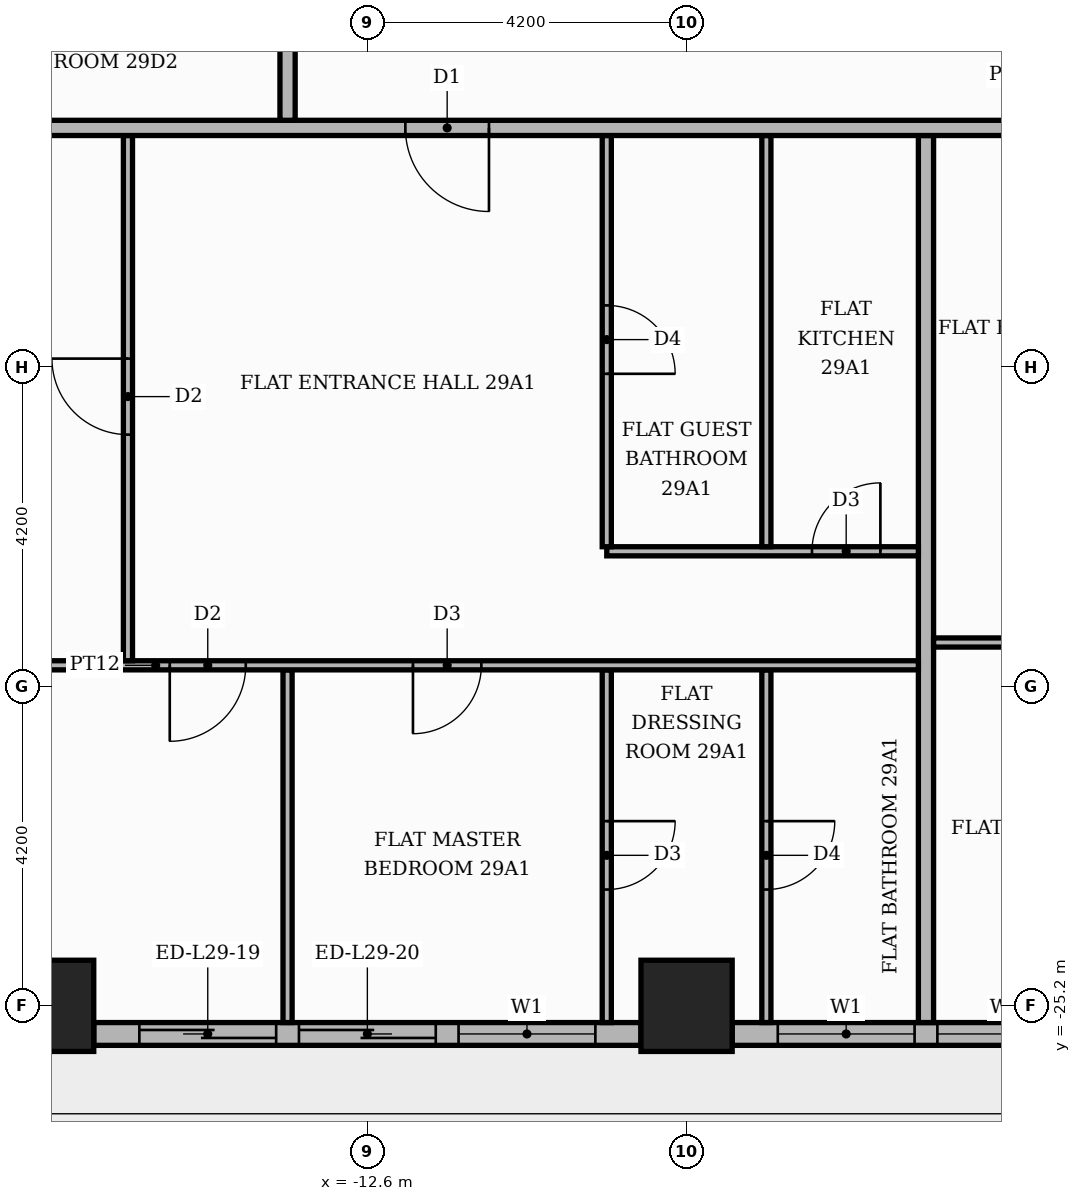
"""IFC4 building model, lengths in metres.
Left out: names, types, materials, properties, quantities, classifications, styles, units other than length and angle.
Written with IfcOpenShell. Run it as: python <this file> out.ifc"""

import sys

from ifc_helpers import new_model, si_unit, direction, frame, frame_2d, origin, origin_2d, place, context, subcontext, project, spatial, rectangle, extrude, element, fill, save


model = new_model("IFC4")
c1 = context("Model", 3, precision=1e-05, world=origin(), true_north=direction((0.0, 1.0)))
c2 = subcontext(c1, "Body", "Model", "MODEL_VIEW")
j1 = project(units=[si_unit("LENGTHUNIT", "METRE"), si_unit("PLANEANGLEUNIT", "RADIAN")], contexts=[c1])
p1 = place(None, origin())
s1 = spatial("IfcSite", under=j1, at=p1, CompositionType="ELEMENT")
p2 = place(p1, origin())
s2 = spatial("IfcBuilding", under=s1, at=p2, CompositionType="ELEMENT")
p3 = place(p2, frame((0.0, 0.0, 122.1)))
s3 = spatial("IfcBuildingStorey", under=s2, at=p3, CompositionType="ELEMENT", Elevation=122.1)
for number, where, z_axis, x_axis in (
    (1, (-8.4, -25.2, 0.0), (0.0, 0.0, 1.0), (1.0, 0.0, 0.0)),
    (2, (-16.8, -25.2, 0.0), (0.0, 0.0, 1.0), (1.0, 0.0, 0.0)),
):
    element("IfcColumn", number, at=place(p3, frame(where, z_axis=z_axis, x_axis=x_axis)), inside=s3, PredefinedType="COLUMN", context=c2, shape_type="SweptSolid", body=[
        extrude(rectangle(XDim=1.2, YDim=1.2, at=origin_2d()), origin(), (0.0, 0.0, 1.0), 3.9),
    ])
p4 = place(p3, frame((-16.2, -25.57, 0.0), z_axis=(0.0, 0.0, 1.0), x_axis=(1.0, 0.0, 0.0)))
e3 = element("IfcWall", 3, at=p4, inside=s3, PredefinedType="STANDARD", context=c2, shape_type="SweptSolid", body=[
    extrude(rectangle(XDim=7.2, YDim=0.3, at=frame_2d((3.6, 0.0))), origin(), (0.0, 0.0, 1.0), 3.4),
])
p5 = place(p4, frame((0.6, 0.0, 0.0)))
e4 = element("IfcOpeningElement", 4, at=p5, cuts=e3, PredefinedType="OPENING", context=c2, shape_type="SweptSolid", body=[
    extrude(rectangle(XDim=1.8, YDim=2.4, at=frame_2d((0.9, 1.2))), frame((0.0, 0.16, 0.0), z_axis=(0.0, -1.0, 0.0), x_axis=(1.0, 0.0, 0.0)), (0.0, 0.0, 1.0), 0.32),
])
p6 = place(p4, frame((2.7, 0.0, 0.0)))
e5 = element("IfcOpeningElement", 5, at=p6, cuts=e3, PredefinedType="OPENING", context=c2, shape_type="SweptSolid", body=[
    extrude(rectangle(XDim=1.8, YDim=2.4, at=frame_2d((0.9, 1.2))), frame((0.0, 0.16, 0.0), z_axis=(0.0, -1.0, 0.0), x_axis=(1.0, 0.0, 0.0)), (0.0, 0.0, 1.0), 0.32),
])
p7 = place(p4, frame((4.8, 0.0, 0.9)))
e6 = element("IfcOpeningElement", 6, at=p7, cuts=e3, PredefinedType="OPENING", context=c2, shape_type="SweptSolid", body=[
    extrude(rectangle(XDim=1.8, YDim=2.1, at=frame_2d((0.9, 1.05))), frame((0.0, 0.16, 0.0), z_axis=(0.0, -1.0, 0.0), x_axis=(1.0, 0.0, 0.0)), (0.0, 0.0, 1.0), 0.32),
])
p8 = place(p3, frame((-7.8, -25.57, 0.0), z_axis=(0.0, 0.0, 1.0), x_axis=(1.0, 0.0, 0.0)))
e7 = element("IfcWall", 7, at=p8, inside=s3, PredefinedType="STANDARD", context=c2, shape_type="SweptSolid", body=[
    extrude(rectangle(XDim=7.2, YDim=0.3, at=frame_2d((3.6, 0.0))), origin(), (0.0, 0.0, 1.0), 3.4),
])
p9 = place(p8, frame((0.6, 0.0, 0.9)))
e8 = element("IfcOpeningElement", 8, at=p9, cuts=e7, PredefinedType="OPENING", context=c2, shape_type="SweptSolid", body=[
    extrude(rectangle(XDim=1.8, YDim=2.1, at=frame_2d((0.9, 1.05))), frame((0.0, 0.16, 0.0), z_axis=(0.0, -1.0, 0.0), x_axis=(1.0, 0.0, 0.0)), (0.0, 0.0, 1.0), 0.32),
])
p10 = place(p8, frame((2.7, 0.0, 0.9)))
e9 = element("IfcOpeningElement", 9, at=p10, cuts=e7, PredefinedType="OPENING", context=c2, shape_type="SweptSolid", body=[
    extrude(rectangle(XDim=1.8, YDim=2.1, at=frame_2d((0.9, 1.05))), frame((0.0, 0.16, 0.0), z_axis=(0.0, -1.0, 0.0), x_axis=(1.0, 0.0, 0.0)), (0.0, 0.0, 1.0), 0.32),
])
p11 = place(p8, frame((4.8, 0.0, 0.0)))
e10 = element("IfcOpeningElement", 10, at=p11, cuts=e7, PredefinedType="OPENING", context=c2, shape_type="SweptSolid", body=[
    extrude(rectangle(XDim=1.8, YDim=2.4, at=frame_2d((0.9, 1.2))), frame((0.0, 0.16, 0.0), z_axis=(0.0, -1.0, 0.0), x_axis=(1.0, 0.0, 0.0)), (0.0, 0.0, 1.0), 0.32),
])
p12 = place(p3, frame((-13.65, -25.42, 0.0), z_axis=(0.0, 0.0, 1.0), x_axis=(0.0, 1.0, 0.0)))
e11 = element("IfcWall", 11, at=p12, inside=s3, PredefinedType="PARTITIONING", context=c2, shape_type="SweptSolid", body=[
    extrude(rectangle(XDim=4.64, YDim=0.12, at=frame_2d((2.32, 0.0))), origin(), (0.0, 0.0, 1.0), 3.4),
])
p13 = place(p3, frame((-9.45, -25.42, 0.0), z_axis=(0.0, 0.0, 1.0), x_axis=(0.0, 1.0, 0.0)))
e12 = element("IfcWall", 12, at=p13, inside=s3, PredefinedType="PARTITIONING", context=c2, shape_type="SweptSolid", body=[
    extrude(rectangle(XDim=4.64, YDim=0.12, at=frame_2d((2.32, 0.0))), origin(), (0.0, 0.0, 1.0), 3.4),
])
p14 = place(p13, frame((1.75, 0.0, 0.0)))
e13 = element("IfcOpeningElement", 13, at=p14, cuts=e12, PredefinedType="OPENING", context=c2, shape_type="SweptSolid", body=[
    extrude(rectangle(XDim=0.9, YDim=2.1, at=frame_2d((0.45, 1.05))), frame((0.0, 0.07, 0.0), z_axis=(0.0, -1.0, 0.0), x_axis=(1.0, 0.0, 0.0)), (0.0, 0.0, 1.0), 0.14),
])
p15 = place(p3, frame((-7.35, -25.42, 0.0), z_axis=(0.0, 0.0, 1.0), x_axis=(0.0, 1.0, 0.0)))
e14 = element("IfcWall", 14, at=p15, inside=s3, PredefinedType="PARTITIONING", context=c2, shape_type="SweptSolid", body=[
    extrude(rectangle(XDim=4.64, YDim=0.12, at=frame_2d((2.32, 0.0))), origin(), (0.0, 0.0, 1.0), 3.4),
])
p16 = place(p15, frame((1.75, 0.0, 0.0)))
e15 = element("IfcOpeningElement", 15, at=p16, cuts=e14, PredefinedType="OPENING", context=c2, shape_type="SweptSolid", body=[
    extrude(rectangle(XDim=0.9, YDim=2.1, at=frame_2d((0.45, 1.05))), frame((0.0, 0.07, 0.0), z_axis=(0.0, -1.0, 0.0), x_axis=(1.0, 0.0, 0.0)), (0.0, 0.0, 1.0), 0.14),
])
p17 = place(p3, frame((-5.25, -25.42, 0.0), z_axis=(0.0, 0.0, 1.0), x_axis=(0.0, 1.0, 0.0)))
e16 = element("IfcWall", 16, at=p17, inside=s3, PredefinedType="PARTITIONING", context=c2, shape_type="SweptSolid", body=[
    extrude(rectangle(XDim=11.67, YDim=0.2, at=frame_2d((5.835, 0.0))), origin(), (0.0, 0.0, 1.0), 3.4),
])
p18 = place(p3, frame((-25.42, -20.72, 0.0), z_axis=(0.0, 0.0, 1.0), x_axis=(1.0, 0.0, 0.0)))
e17 = element("IfcWall", 17, at=p18, inside=s3, PredefinedType="PARTITIONING", context=c2, shape_type="SweptSolid", body=[
    extrude(rectangle(XDim=20.07, YDim=0.12, at=frame_2d((10.035, 0.0))), origin(), (0.0, 0.0, 1.0), 3.4),
])
p19 = place(p18, frame((10.22, 0.0, 0.0)))
e18 = element("IfcOpeningElement", 18, at=p19, cuts=e17, PredefinedType="OPENING", context=c2, shape_type="SweptSolid", body=[
    extrude(rectangle(XDim=1.0, YDim=2.1, at=frame_2d((0.5, 1.05))), frame((0.0, 0.07, 0.0), z_axis=(0.0, -1.0, 0.0), x_axis=(1.0, 0.0, 0.0)), (0.0, 0.0, 1.0), 0.14),
])
p20 = place(p18, frame((13.42, 0.0, 0.0)))
e19 = element("IfcOpeningElement", 19, at=p20, cuts=e17, PredefinedType="OPENING", context=c2, shape_type="SweptSolid", body=[
    extrude(rectangle(XDim=0.9, YDim=2.1, at=frame_2d((0.45, 1.05))), frame((0.0, 0.07, 0.0), z_axis=(0.0, -1.0, 0.0), x_axis=(1.0, 0.0, 0.0)), (0.0, 0.0, 1.0), 0.14),
])
p21 = place(p3, frame((-15.75, -20.66, 0.0), z_axis=(0.0, 0.0, 1.0), x_axis=(0.0, 1.0, 0.0)))
e20 = element("IfcWall", 20, at=p21, inside=s3, PredefinedType="PARTITIONING", context=c2, shape_type="SweptSolid", body=[
    extrude(rectangle(XDim=6.91, YDim=0.12, at=frame_2d((3.455, 0.0))), origin(), (0.0, 0.0, 1.0), 3.4),
])
p22 = place(p21, frame((2.975, 0.0, 0.0)))
e21 = element("IfcOpeningElement", 21, at=p22, cuts=e20, PredefinedType="OPENING", context=c2, shape_type="SweptSolid", body=[
    extrude(rectangle(XDim=1.0, YDim=2.1, at=frame_2d((0.5, 1.05))), frame((0.0, 0.07, 0.0), z_axis=(0.0, -1.0, 0.0), x_axis=(1.0, 0.0, 0.0)), (0.0, 0.0, 1.0), 0.14),
])
p23 = place(p3, frame((-5.15, -20.42, 0.0), z_axis=(0.0, 0.0, 1.0), x_axis=(1.0, 0.0, 0.0)))
e22 = element("IfcWall", 22, at=p23, inside=s3, PredefinedType="PARTITIONING", context=c2, shape_type="SweptSolid", body=[
    extrude(rectangle(XDim=18.7, YDim=0.12, at=frame_2d((9.35, 0.0))), origin(), (0.0, 0.0, 1.0), 3.4),
])
p24 = place(p23, frame((3.65, 0.0, 0.0)))
e23 = element("IfcOpeningElement", 23, at=p24, cuts=e22, PredefinedType="OPENING", context=c2, shape_type="SweptSolid", body=[
    extrude(rectangle(XDim=0.9, YDim=2.1, at=frame_2d((0.45, 1.05))), frame((0.0, 0.07, 0.0), z_axis=(0.0, -1.0, 0.0), x_axis=(1.0, 0.0, 0.0)), (0.0, 0.0, 1.0), 0.14),
])
p25 = place(p23, frame((15.15, 0.0, 0.0)))
e24 = element("IfcOpeningElement", 24, at=p25, cuts=e22, PredefinedType="OPENING", context=c2, shape_type="SweptSolid", body=[
    extrude(rectangle(XDim=1.0, YDim=2.1, at=frame_2d((0.5, 1.05))), frame((0.0, 0.07, 0.0), z_axis=(0.0, -1.0, 0.0), x_axis=(1.0, 0.0, 0.0)), (0.0, 0.0, 1.0), 0.14),
])
p26 = place(p3, frame((-9.45, -19.22, 0.0), z_axis=(0.0, 0.0, 1.0), x_axis=(1.0, 0.0, 0.0)))
e25 = element("IfcWall", 25, at=p26, inside=s3, PredefinedType="PARTITIONING", context=c2, shape_type="SweptSolid", body=[
    extrude(rectangle(XDim=4.1, YDim=0.12, at=frame_2d((2.05, 0.0))), origin(), (0.0, 0.0, 1.0), 3.4),
])
p27 = place(p26, frame((2.7, 0.0, 0.0)))
e26 = element("IfcOpeningElement", 26, at=p27, cuts=e25, PredefinedType="OPENING", context=c2, shape_type="SweptSolid", body=[
    extrude(rectangle(XDim=0.9, YDim=2.1, at=frame_2d((0.45, 1.05))), frame((0.0, 0.07, 0.0), z_axis=(0.0, -1.0, 0.0), x_axis=(1.0, 0.0, 0.0)), (0.0, 0.0, 1.0), 0.14),
])
p28 = place(p3, frame((-9.45, -19.16, 0.0), z_axis=(0.0, 0.0, 1.0), x_axis=(0.0, 1.0, 0.0)))
e27 = element("IfcWall", 27, at=p28, inside=s3, PredefinedType="PARTITIONING", context=c2, shape_type="SweptSolid", body=[
    extrude(rectangle(XDim=5.41, YDim=0.12, at=frame_2d((2.705, 0.0))), origin(), (0.0, 0.0, 1.0), 3.4),
])
p29 = place(p28, frame((2.275, 0.0, 0.0)))
e28 = element("IfcOpeningElement", 28, at=p29, cuts=e27, PredefinedType="OPENING", context=c2, shape_type="SweptSolid", body=[
    extrude(rectangle(XDim=0.9, YDim=2.1, at=frame_2d((0.45, 1.05))), frame((0.0, 0.07, 0.0), z_axis=(0.0, -1.0, 0.0), x_axis=(1.0, 0.0, 0.0)), (0.0, 0.0, 1.0), 0.14),
])
p30 = place(p3, frame((-7.35, -19.16, 0.0), z_axis=(0.0, 0.0, 1.0), x_axis=(0.0, 1.0, 0.0)))
e29 = element("IfcWall", 29, at=p30, inside=s3, PredefinedType="PARTITIONING", context=c2, shape_type="SweptSolid", body=[
    extrude(rectangle(XDim=5.41, YDim=0.12, at=frame_2d((2.705, 0.0))), origin(), (0.0, 0.0, 1.0), 3.4),
])
p31 = place(p3, frame((-20.42, -13.65, 0.0), z_axis=(0.0, 0.0, 1.0), x_axis=(1.0, 0.0, 0.0)))
e30 = element("IfcWall", 30, at=p31, inside=s3, PredefinedType="PARTITIONING", context=c2, shape_type="SweptSolid", body=[
    extrude(rectangle(XDim=34.07, YDim=0.2, at=frame_2d((17.035, 0.0))), origin(), (0.0, 0.0, 1.0), 3.4),
])
p32 = place(p31, frame((8.32, 0.0, 0.0)))
e31 = element("IfcOpeningElement", 31, at=p32, cuts=e30, PredefinedType="OPENING", context=c2, shape_type="SweptSolid", body=[
    extrude(rectangle(XDim=1.1, YDim=2.4, at=frame_2d((0.55, 1.2))), frame((0.0, 0.11, 0.0), z_axis=(0.0, -1.0, 0.0), x_axis=(1.0, 0.0, 0.0)), (0.0, 0.0, 1.0), 0.22),
])
p33 = place(p31, frame((16.72, 0.0, 0.0)))
e32 = element("IfcOpeningElement", 32, at=p33, cuts=e30, PredefinedType="OPENING", context=c2, shape_type="SweptSolid", body=[
    extrude(rectangle(XDim=1.1, YDim=2.4, at=frame_2d((0.55, 1.2))), frame((0.0, 0.11, 0.0), z_axis=(0.0, -1.0, 0.0), x_axis=(1.0, 0.0, 0.0)), (0.0, 0.0, 1.0), 0.22),
])
p34 = place(p3, frame((-13.65, -13.55, 0.0), z_axis=(0.0, 0.0, 1.0), x_axis=(0.0, 1.0, 0.0)))
e33 = element("IfcWall", 33, at=p34, inside=s3, PredefinedType="PARTITIONING", context=c2, shape_type="SweptSolid", body=[
    extrude(rectangle(XDim=18.7, YDim=0.2, at=frame_2d((9.35, 0.0))), origin(), (0.0, 0.0, 1.0), 3.4),
])
p35 = place(p34, frame((11.95, 0.0, 0.0)))
e34 = element("IfcOpeningElement", 34, at=p35, cuts=e33, PredefinedType="OPENING", context=c2, shape_type="SweptSolid", body=[
    extrude(rectangle(XDim=1.1, YDim=2.4, at=frame_2d((0.55, 1.2))), frame((0.0, 0.11, 0.0), z_axis=(0.0, -1.0, 0.0), x_axis=(1.0, 0.0, 0.0)), (0.0, 0.0, 1.0), 0.22),
])
p36 = place(p5, origin())
e35 = element("IfcDoor", 35, at=p36, inside=s3, OperationType="SLIDING_TO_LEFT", PredefinedType="DOOR", context=c2, shape_type="SweptSolid", body=[
    extrude(rectangle(XDim=1.8, YDim=2.4, at=frame_2d((0.9, 1.2))), frame((0.0, 0.025, 0.0), z_axis=(0.0, -1.0, 0.0), x_axis=(1.0, 0.0, 0.0)), (0.0, 0.0, 1.0), 0.05),
])
fill(e4, e35)
p37 = place(p6, origin())
e36 = element("IfcDoor", 36, at=p37, inside=s3, OperationType="SLIDING_TO_RIGHT", PredefinedType="DOOR", context=c2, shape_type="SweptSolid", body=[
    extrude(rectangle(XDim=1.8, YDim=2.4, at=frame_2d((0.9, 1.2))), frame((0.0, 0.025, 0.0), z_axis=(0.0, -1.0, 0.0), x_axis=(1.0, 0.0, 0.0)), (0.0, 0.0, 1.0), 0.05),
])
fill(e5, e36)
p38 = place(p7, origin())
e37 = element("IfcWindow", 37, at=p38, inside=s3, PartitioningType="SINGLE_PANEL", PredefinedType="WINDOW", context=c2, shape_type="SweptSolid", body=[
    extrude(rectangle(XDim=1.8, YDim=2.1, at=frame_2d((0.9, 1.05))), frame((0.0, 0.03, 0.0), z_axis=(0.0, -1.0, 0.0), x_axis=(1.0, 0.0, 0.0)), (0.0, 0.0, 1.0), 0.06),
])
fill(e6, e37)
p39 = place(p9, origin())
e38 = element("IfcWindow", 38, at=p39, inside=s3, PartitioningType="SINGLE_PANEL", PredefinedType="WINDOW", context=c2, shape_type="SweptSolid", body=[
    extrude(rectangle(XDim=1.8, YDim=2.1, at=frame_2d((0.9, 1.05))), frame((0.0, 0.03, 0.0), z_axis=(0.0, -1.0, 0.0), x_axis=(1.0, 0.0, 0.0)), (0.0, 0.0, 1.0), 0.06),
])
fill(e8, e38)
p40 = place(p10, origin())
e39 = element("IfcWindow", 39, at=p40, inside=s3, PartitioningType="SINGLE_PANEL", PredefinedType="WINDOW", context=c2, shape_type="SweptSolid", body=[
    extrude(rectangle(XDim=1.8, YDim=2.1, at=frame_2d((0.9, 1.05))), frame((0.0, 0.03, 0.0), z_axis=(0.0, -1.0, 0.0), x_axis=(1.0, 0.0, 0.0)), (0.0, 0.0, 1.0), 0.06),
])
fill(e9, e39)
p41 = place(p32, frame((1.1, 0.0, 0.0), z_axis=(0.0, 0.0, 1.0), x_axis=(-1.0, 0.0, 0.0)))
e40 = element("IfcDoor", 40, at=p41, inside=s3, OperationType="SINGLE_SWING_RIGHT", PredefinedType="DOOR", context=c2, shape_type="SweptSolid", body=[
    extrude(rectangle(XDim=1.1, YDim=2.4, at=frame_2d((0.55, 1.2))), frame((0.0, 0.025, 0.0), z_axis=(0.0, -1.0, 0.0), x_axis=(1.0, 0.0, 0.0)), (0.0, 0.0, 1.0), 0.05),
])
fill(e31, e40)
p42 = place(p22, origin())
e41 = element("IfcDoor", 41, at=p42, inside=s3, OperationType="SINGLE_SWING_RIGHT", PredefinedType="DOOR", context=c2, shape_type="SweptSolid", body=[
    extrude(rectangle(XDim=1.0, YDim=2.1, at=frame_2d((0.5, 1.05))), frame((0.0, 0.025, 0.0), z_axis=(0.0, -1.0, 0.0), x_axis=(1.0, 0.0, 0.0)), (0.0, 0.0, 1.0), 0.05),
])
fill(e21, e41)
p43 = place(p29, frame((0.9, 0.0, 0.0), z_axis=(0.0, 0.0, 1.0), x_axis=(-1.0, 0.0, 0.0)))
e42 = element("IfcDoor", 42, at=p43, inside=s3, OperationType="SINGLE_SWING_LEFT", PredefinedType="DOOR", context=c2, shape_type="SweptSolid", body=[
    extrude(rectangle(XDim=0.9, YDim=2.1, at=frame_2d((0.45, 1.05))), frame((0.0, 0.025, 0.0), z_axis=(0.0, -1.0, 0.0), x_axis=(1.0, 0.0, 0.0)), (0.0, 0.0, 1.0), 0.05),
])
fill(e28, e42)
p44 = place(p27, origin())
e43 = element("IfcDoor", 43, at=p44, inside=s3, OperationType="SINGLE_SWING_RIGHT", PredefinedType="DOOR", context=c2, shape_type="SweptSolid", body=[
    extrude(rectangle(XDim=0.9, YDim=2.1, at=frame_2d((0.45, 1.05))), frame((0.0, 0.025, 0.0), z_axis=(0.0, -1.0, 0.0), x_axis=(1.0, 0.0, 0.0)), (0.0, 0.0, 1.0), 0.05),
])
fill(e26, e43)
p45 = place(p19, frame((1.0, 0.0, 0.0), z_axis=(0.0, 0.0, 1.0), x_axis=(-1.0, 0.0, 0.0)))
e44 = element("IfcDoor", 44, at=p45, inside=s3, OperationType="SINGLE_SWING_LEFT", PredefinedType="DOOR", context=c2, shape_type="SweptSolid", body=[
    extrude(rectangle(XDim=1.0, YDim=2.1, at=frame_2d((0.5, 1.05))), frame((0.0, 0.025, 0.0), z_axis=(0.0, -1.0, 0.0), x_axis=(1.0, 0.0, 0.0)), (0.0, 0.0, 1.0), 0.05),
])
fill(e18, e44)
p46 = place(p20, frame((0.9, 0.0, 0.0), z_axis=(0.0, 0.0, 1.0), x_axis=(-1.0, 0.0, 0.0)))
e45 = element("IfcDoor", 45, at=p46, inside=s3, OperationType="SINGLE_SWING_LEFT", PredefinedType="DOOR", context=c2, shape_type="SweptSolid", body=[
    extrude(rectangle(XDim=0.9, YDim=2.1, at=frame_2d((0.45, 1.05))), frame((0.0, 0.025, 0.0), z_axis=(0.0, -1.0, 0.0), x_axis=(1.0, 0.0, 0.0)), (0.0, 0.0, 1.0), 0.05),
])
fill(e19, e45)
p47 = place(p14, frame((0.9, 0.0, 0.0), z_axis=(0.0, 0.0, 1.0), x_axis=(-1.0, 0.0, 0.0)))
e46 = element("IfcDoor", 46, at=p47, inside=s3, OperationType="SINGLE_SWING_RIGHT", PredefinedType="DOOR", context=c2, shape_type="SweptSolid", body=[
    extrude(rectangle(XDim=0.9, YDim=2.1, at=frame_2d((0.45, 1.05))), frame((0.0, 0.025, 0.0), z_axis=(0.0, -1.0, 0.0), x_axis=(1.0, 0.0, 0.0)), (0.0, 0.0, 1.0), 0.05),
])
fill(e13, e46)
p48 = place(p16, frame((0.9, 0.0, 0.0), z_axis=(0.0, 0.0, 1.0), x_axis=(-1.0, 0.0, 0.0)))
e47 = element("IfcDoor", 47, at=p48, inside=s3, OperationType="SINGLE_SWING_RIGHT", PredefinedType="DOOR", context=c2, shape_type="SweptSolid", body=[
    extrude(rectangle(XDim=0.9, YDim=2.1, at=frame_2d((0.45, 1.05))), frame((0.0, 0.025, 0.0), z_axis=(0.0, -1.0, 0.0), x_axis=(1.0, 0.0, 0.0)), (0.0, 0.0, 1.0), 0.05),
])
fill(e15, e47)
save(model, sys.argv[1])
